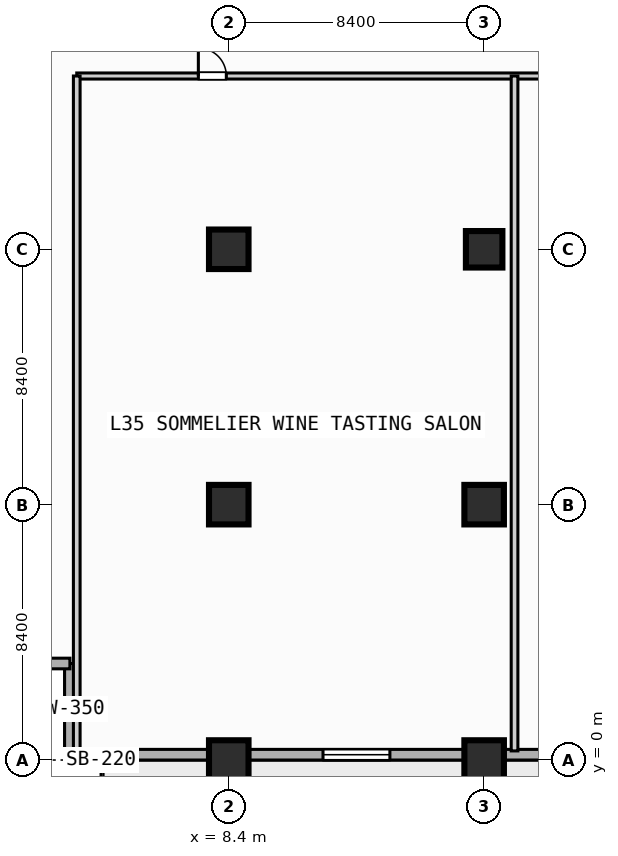
"""IFC4 building model, lengths in metres.
Left out: names, types, materials, properties, quantities, classifications, styles, units other than length and angle.
Written with IfcOpenShell. Run it as: python <this file> out.ifc"""

import sys

from ifc_helpers import new_model, si_unit, direction, frame, frame_2d, origin, origin_2d, place, context, subcontext, project, spatial, rectangle, extrude, element, fill, save


model = new_model("IFC4")
c1 = context("Model", 3, precision=1e-05, world=origin(), true_north=direction((0.0, 1.0)))
c2 = subcontext(c1, "Body", "Model", "MODEL_VIEW")
j1 = project(units=[si_unit("LENGTHUNIT", "METRE"), si_unit("PLANEANGLEUNIT", "RADIAN")], contexts=[c1])
p1 = place(None, origin())
s1 = spatial("IfcSite", under=j1, at=p1, CompositionType="ELEMENT")
p2 = place(p1, origin())
s2 = spatial("IfcBuilding", under=s1, at=p2, CompositionType="ELEMENT")
p3 = place(p2, frame((0.0, 0.0, 145.6)))
s3 = spatial("IfcBuildingStorey", under=s2, at=p3, CompositionType="ELEMENT", Elevation=145.6)
for number, where, z_axis, x_axis in (
    (1, (8.4, 0.0, 0.0), (0.0, 0.0, 1.0), (1.0, 0.0, 0.0)),
    (2, (8.4, 8.4, 0.0), (0.0, 0.0, 1.0), (1.0, 0.0, 0.0)),
    (3, (8.4, 16.8, 0.0), (0.0, 0.0, 1.0), (1.0, 0.0, 0.0)),
    (4, (16.8, 0.0, 0.0), (0.0, 0.0, 1.0), (1.0, 0.0, 0.0)),
    (5, (16.8, 8.4, 0.0), (0.0, 0.0, 1.0), (1.0, 0.0, 0.0)),
):
    element("IfcColumn", number, at=place(p3, frame(where, z_axis=z_axis, x_axis=x_axis)), inside=s3, PredefinedType="COLUMN", context=c2, shape_type="SweptSolid", body=[
        extrude(rectangle(XDim=1.3, YDim=1.3, at=origin_2d()), origin(), (0.0, 0.0, 1.0), 3.8),
    ])
p4 = place(p3, frame((16.8, 16.8, 0.0), z_axis=(0.0, 0.0, 1.0), x_axis=(1.0, 0.0, 0.0)))
e6 = element("IfcColumn", 6, at=p4, inside=s3, PredefinedType="COLUMN", context=c2, shape_type="SweptSolid", body=[
    extrude(rectangle(XDim=1.2, YDim=1.2, at=origin_2d()), origin(), (0.0, 0.0, 1.0), 3.8),
])
for number, where, z_axis, x_axis in (
    (7, (3.175, 0.175, 0.0), (0.0, 0.0, 1.0), (0.0, 1.0, 0.0)),
    (8, (3.175, 3.175, 0.0), (0.0, 0.0, 1.0), (-1.0, 0.0, 0.0)),
):
    element("IfcWall", number, at=place(p3, frame(where, z_axis=z_axis, x_axis=x_axis)), inside=s3, PredefinedType="STANDARD", context=c2, shape_type="SweptSolid", body=[
        extrude(rectangle(XDim=3.0, YDim=0.35, at=frame_2d((1.5, 0.0))), origin(), (0.0, 0.0, 1.0), 3.55),
    ])
p5 = place(p3, frame((72.425, 0.175, 0.0), z_axis=(0.0, 0.0, 1.0), x_axis=(-1.0, 0.0, 0.0)))
e9 = element("IfcWall", 9, at=p5, inside=s3, PredefinedType="STANDARD", context=c2, shape_type="SweptSolid", body=[
    extrude(rectangle(XDim=69.25, YDim=0.35, at=frame_2d((34.625, 0.0))), origin(), (0.0, 0.0, 1.0), 3.55),
])
p6 = place(p5, frame((50.725, 0.0, 0.0)))
e10 = element("IfcOpeningElement", 10, at=p6, cuts=e9, PredefinedType="OPENING", context=c2, shape_type="SweptSolid", body=[
    extrude(rectangle(XDim=1.4, YDim=2.2, at=frame_2d((0.7, 1.1))), frame((0.0, 0.185, 0.0), z_axis=(0.0, -1.0, 0.0), x_axis=(1.0, 0.0, 0.0)), (0.0, 0.0, 1.0), 0.37),
])
p7 = place(p5, frame((58.725, 0.0, 0.85)))
e11 = element("IfcOpeningElement", 11, at=p7, cuts=e9, PredefinedType="OPENING", context=c2, shape_type="SweptSolid", body=[
    extrude(rectangle(XDim=2.2, YDim=1.8, at=frame_2d((1.1, 0.9))), frame((0.0, 0.185, 0.0), z_axis=(0.0, -1.0, 0.0), x_axis=(1.0, 0.0, 0.0)), (0.0, 0.0, 1.0), 0.37),
])
p8 = place(p5, frame((33.525, 0.0, 0.85)))
e12 = element("IfcOpeningElement", 12, at=p8, cuts=e9, PredefinedType="OPENING", context=c2, shape_type="SweptSolid", body=[
    extrude(rectangle(XDim=2.2, YDim=1.8, at=frame_2d((1.1, 0.9))), frame((0.0, 0.185, 0.0), z_axis=(0.0, -1.0, 0.0), x_axis=(1.0, 0.0, 0.0)), (0.0, 0.0, 1.0), 0.37),
])
p9 = place(p5, frame((25.125, 0.0, 0.85)))
e13 = element("IfcOpeningElement", 13, at=p9, cuts=e9, PredefinedType="OPENING", context=c2, shape_type="SweptSolid", body=[
    extrude(rectangle(XDim=2.2, YDim=1.8, at=frame_2d((1.1, 0.9))), frame((0.0, 0.185, 0.0), z_axis=(0.0, -1.0, 0.0), x_axis=(1.0, 0.0, 0.0)), (0.0, 0.0, 1.0), 0.37),
])
p10 = place(p5, frame((8.325, 0.0, 0.85)))
e14 = element("IfcOpeningElement", 14, at=p10, cuts=e9, PredefinedType="OPENING", context=c2, shape_type="SweptSolid", body=[
    extrude(rectangle(XDim=2.2, YDim=1.8, at=frame_2d((1.1, 0.9))), frame((0.0, 0.185, 0.0), z_axis=(0.0, -1.0, 0.0), x_axis=(1.0, 0.0, 0.0)), (0.0, 0.0, 1.0), 0.37),
])
p11 = place(p5, frame((2.125, 0.0, 0.85)))
e15 = element("IfcOpeningElement", 15, at=p11, cuts=e9, PredefinedType="OPENING", context=c2, shape_type="SweptSolid", body=[
    extrude(rectangle(XDim=1.8, YDim=1.8, at=frame_2d((0.9, 0.9))), frame((0.0, 0.185, 0.0), z_axis=(0.0, -1.0, 0.0), x_axis=(1.0, 0.0, 0.0)), (0.0, 0.0, 1.0), 0.37),
])
p12 = place(p3, frame((3.4, 22.5, 0.0), z_axis=(0.0, 0.0, 1.0), x_axis=(1.0, 0.0, 0.0)))
e16 = element("IfcWall", 16, at=p12, inside=s3, PredefinedType="PARTITIONING", context=c2, shape_type="SweptSolid", body=[
    extrude(rectangle(XDim=35.8, YDim=0.2, at=frame_2d((17.9, 0.0))), origin(), (0.0, 0.0, 1.0), 3.55),
])
p13 = place(p12, frame((4.0, 0.0, 0.0)))
e17 = element("IfcOpeningElement", 17, at=p13, cuts=e16, PredefinedType="OPENING", context=c2, shape_type="SweptSolid", body=[
    extrude(rectangle(XDim=0.92, YDim=2.1, at=frame_2d((0.46, 1.05))), frame((0.0, 0.11, 0.0), z_axis=(0.0, -1.0, 0.0), x_axis=(1.0, 0.0, 0.0)), (0.0, 0.0, 1.0), 0.22),
])
p14 = place(p12, frame((17.5, 0.0, 0.0)))
e18 = element("IfcOpeningElement", 18, at=p14, cuts=e16, PredefinedType="OPENING", context=c2, shape_type="SweptSolid", body=[
    extrude(rectangle(XDim=2.0, YDim=2.15, at=frame_2d((1.0, 1.075))), frame((0.0, 0.11, 0.0), z_axis=(0.0, -1.0, 0.0), x_axis=(1.0, 0.0, 0.0)), (0.0, 0.0, 1.0), 0.22),
])
p15 = place(p12, frame((27.5, 0.0, 0.0)))
e19 = element("IfcOpeningElement", 19, at=p15, cuts=e16, PredefinedType="OPENING", context=c2, shape_type="SweptSolid", body=[
    extrude(rectangle(XDim=2.0, YDim=2.15, at=frame_2d((1.0, 1.075))), frame((0.0, 0.11, 0.0), z_axis=(0.0, -1.0, 0.0), x_axis=(1.0, 0.0, 0.0)), (0.0, 0.0, 1.0), 0.22),
])
for number, where, z_axis, x_axis in (
    (20, (3.4, 0.3, 0.0), (0.0, 0.0, 1.0), (0.0, 1.0, 0.0)),
    (21, (17.8, 0.3, 0.0), (0.0, 0.0, 1.0), (0.0, 1.0, 0.0)),
):
    element("IfcWall", number, at=place(p3, frame(where, z_axis=z_axis, x_axis=x_axis)), inside=s3, PredefinedType="PARTITIONING", context=c2, shape_type="SweptSolid", body=[
        extrude(rectangle(XDim=22.2, YDim=0.22, at=frame_2d((11.1, 0.0))), origin(), (0.0, 0.0, 1.0), 3.55),
    ])
p16 = place(p7, origin())
e22 = element("IfcWindow", 22, at=p16, inside=s3, PartitioningType="SINGLE_PANEL", PredefinedType="WINDOW", context=c2, shape_type="SweptSolid", body=[
    extrude(rectangle(XDim=2.2, YDim=1.8, at=frame_2d((1.1, 0.9))), frame((0.0, 0.03, 0.0), z_axis=(0.0, -1.0, 0.0), x_axis=(1.0, 0.0, 0.0)), (0.0, 0.0, 1.0), 0.06),
])
fill(e11, e22)
p17 = place(p13, origin())
e23 = element("IfcDoor", 23, at=p17, inside=s3, OperationType="SINGLE_SWING_LEFT", PredefinedType="DOOR", context=c2, shape_type="SweptSolid", body=[
    extrude(rectangle(XDim=0.92, YDim=2.1, at=frame_2d((0.46, 1.05))), frame((0.0, 0.025, 0.0), z_axis=(0.0, -1.0, 0.0), x_axis=(1.0, 0.0, 0.0)), (0.0, 0.0, 1.0), 0.05),
])
fill(e17, e23)
save(model, sys.argv[1])
